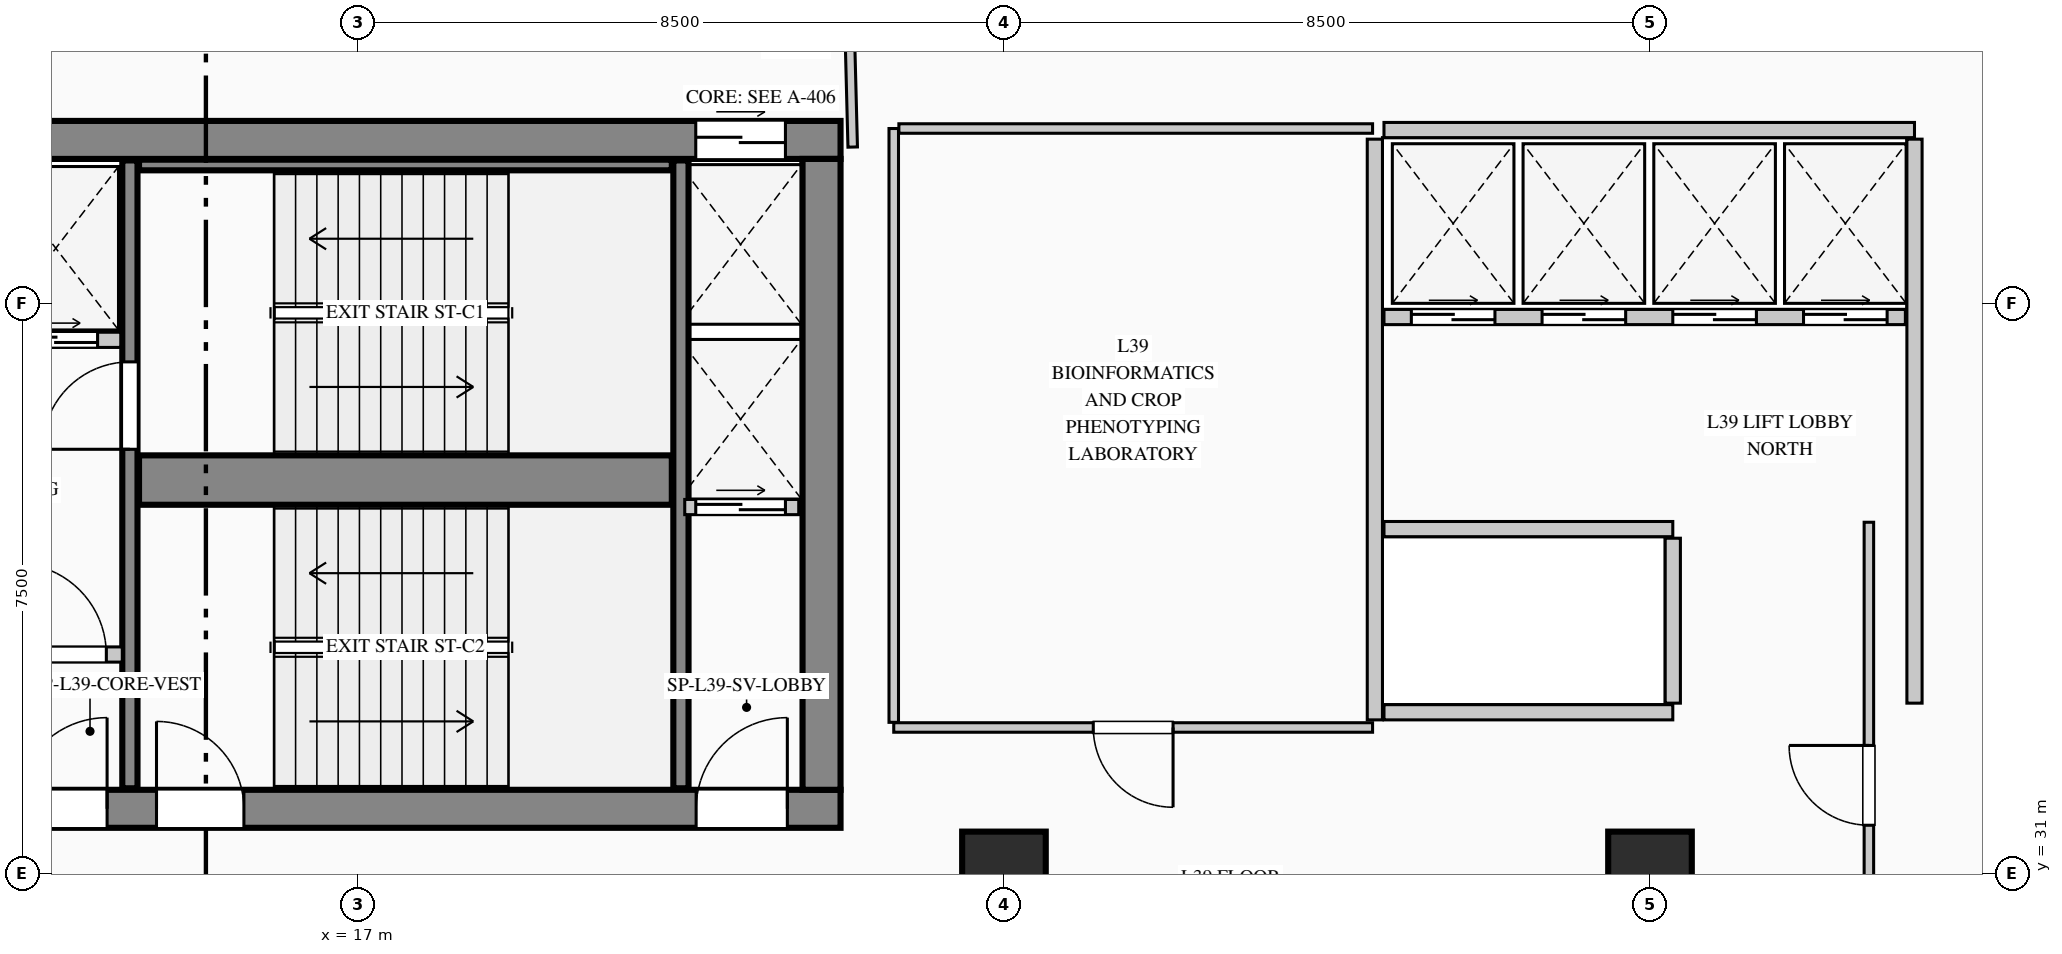
"""IFC4 building model, lengths in metres.
Left out: names, types, materials, properties, quantities, classifications, styles, units other than length and angle.
Written with IfcOpenShell. Run it as: python <this file> out.ifc"""

import sys

from ifc_helpers import new_model, si_unit, direction, frame, frame_2d, origin, origin_2d, place, context, subcontext, project, spatial, rectangle, extrude, element, fill, save


model = new_model("IFC4")
c1 = context("Model", 3, precision=1e-05, world=origin(), true_north=direction((0.0, 1.0)))
c2 = subcontext(c1, "Body", "Model", "MODEL_VIEW")
j1 = project(units=[si_unit("LENGTHUNIT", "METRE"), si_unit("PLANEANGLEUNIT", "RADIAN")], contexts=[c1])
p1 = place(None, origin())
s1 = spatial("IfcSite", under=j1, at=p1, CompositionType="ELEMENT")
p2 = place(p1, origin())
s2 = spatial("IfcBuilding", under=s1, at=p2, CompositionType="ELEMENT")
p3 = place(p2, frame((0.0, 0.0, 166.7)))
s3 = spatial("IfcBuildingStorey", under=s2, at=p3, CompositionType="ELEMENT", Elevation=166.7)
p4 = place(p3, frame((5.5, 40.65, 0.0), z_axis=(0.0, 0.0, 1.0), x_axis=(1.0, 0.0, 0.0)))
e1 = element("IfcWall", 1, at=p4, inside=s3, PredefinedType="SHEAR", context=c2, shape_type="SweptSolid", body=[
    extrude(rectangle(XDim=17.85, YDim=0.5, at=frame_2d((8.925, 0.0))), origin(), (0.0, 0.0, 1.0), 3.95),
])
p5 = place(p4, frame((15.945, 0.0, 0.0)))
e2 = element("IfcOpeningElement", 2, at=p5, cuts=e1, PredefinedType="OPENING", context=c2, shape_type="SweptSolid", body=[
    extrude(rectangle(XDim=1.18, YDim=2.25, at=frame_2d((0.59, 1.125))), frame((0.0, 0.26, 0.0), z_axis=(0.0, -1.0, 0.0), x_axis=(1.0, 0.0, 0.0)), (0.0, 0.0, 1.0), 0.52),
])
p6 = place(p3, frame((5.5, 31.85, 0.0), z_axis=(0.0, 0.0, 1.0), x_axis=(1.0, 0.0, 0.0)))
e3 = element("IfcWall", 3, at=p6, inside=s3, PredefinedType="SHEAR", context=c2, shape_type="SweptSolid", body=[
    extrude(rectangle(XDim=17.85, YDim=0.5, at=frame_2d((8.925, 0.0))), origin(), (0.0, 0.0, 1.0), 3.95),
])
p7 = place(p6, frame((3.15, 0.0, 0.0)))
e4 = element("IfcOpeningElement", 4, at=p7, cuts=e3, PredefinedType="OPENING", context=c2, shape_type="SweptSolid", body=[
    extrude(rectangle(XDim=1.2, YDim=2.2, at=frame_2d((0.6, 1.1))), frame((0.0, 0.26, 0.0), z_axis=(0.0, -1.0, 0.0), x_axis=(1.0, 0.0, 0.0)), (0.0, 0.0, 1.0), 0.52),
])
p8 = place(p6, frame((7.0, 0.0, 0.0)))
e5 = element("IfcOpeningElement", 5, at=p8, cuts=e3, PredefinedType="OPENING", context=c2, shape_type="SweptSolid", body=[
    extrude(rectangle(XDim=1.2, YDim=2.2, at=frame_2d((0.6, 1.1))), frame((0.0, 0.26, 0.0), z_axis=(0.0, -1.0, 0.0), x_axis=(1.0, 0.0, 0.0)), (0.0, 0.0, 1.0), 0.52),
])
p9 = place(p6, frame((8.85, 0.0, 0.0)))
e6 = element("IfcOpeningElement", 6, at=p9, cuts=e3, PredefinedType="OPENING", context=c2, shape_type="SweptSolid", body=[
    extrude(rectangle(XDim=1.15, YDim=2.2, at=frame_2d((0.575, 1.1))), frame((0.0, 0.26, 0.0), z_axis=(0.0, -1.0, 0.0), x_axis=(1.0, 0.0, 0.0)), (0.0, 0.0, 1.0), 0.52),
])
p10 = place(p6, frame((15.95, 0.0, 0.0)))
e7 = element("IfcOpeningElement", 7, at=p10, cuts=e3, PredefinedType="OPENING", context=c2, shape_type="SweptSolid", body=[
    extrude(rectangle(XDim=1.2, YDim=2.2, at=frame_2d((0.6, 1.1))), frame((0.0, 0.26, 0.0), z_axis=(0.0, -1.0, 0.0), x_axis=(1.0, 0.0, 0.0)), (0.0, 0.0, 1.0), 0.52),
])
p11 = place(p3, frame((23.1, 32.1, 0.0), z_axis=(0.0, 0.0, 1.0), x_axis=(0.0, 1.0, 0.0)))
e8 = element("IfcWall", 8, at=p11, inside=s3, PredefinedType="SHEAR", context=c2, shape_type="SweptSolid", body=[
    extrude(rectangle(XDim=8.3, YDim=0.5, at=frame_2d((4.15, 0.0))), origin(), (0.0, 0.0, 1.0), 3.95),
])
p12 = place(p3, frame((14.0, 32.12, 0.0), z_axis=(0.0, 0.0, 1.0), x_axis=(0.0, 1.0, 0.0)))
e9 = element("IfcWall", 9, at=p12, inside=s3, PredefinedType="SHEAR", context=c2, shape_type="SweptSolid", body=[
    extrude(rectangle(XDim=8.26, YDim=0.2, at=frame_2d((4.13, 0.0))), origin(), (0.0, 0.0, 1.0), 3.95),
])
p13 = place(p12, frame((4.46, 0.0, 0.0)))
e10 = element("IfcOpeningElement", 10, at=p13, cuts=e9, PredefinedType="OPENING", context=c2, shape_type="SweptSolid", body=[
    extrude(rectangle(XDim=1.15, YDim=2.2, at=frame_2d((0.575, 1.1))), frame((0.0, 0.11, 0.0), z_axis=(0.0, -1.0, 0.0), x_axis=(1.0, 0.0, 0.0)), (0.0, 0.0, 1.0), 0.22),
])
p14 = place(p3, frame((14.12, 36.175, 0.0), z_axis=(0.0, 0.0, 1.0), x_axis=(1.0, 0.0, 0.0)))
e11 = element("IfcWall", 11, at=p14, inside=s3, PredefinedType="SHEAR", context=c2, shape_type="SweptSolid", body=[
    extrude(rectangle(XDim=7.01, YDim=0.65, at=frame_2d((3.505, 0.0))), origin(), (0.0, 0.0, 1.0), 3.95),
])
p15 = place(p3, frame((21.25, 32.12, 0.0), z_axis=(0.0, 0.0, 1.0), x_axis=(0.0, 1.0, 0.0)))
e12 = element("IfcWall", 12, at=p15, inside=s3, PredefinedType="SHEAR", context=c2, shape_type="SweptSolid", body=[
    extrude(rectangle(XDim=8.26, YDim=0.2, at=frame_2d((4.13, 0.0))), origin(), (0.0, 0.0, 1.0), 3.95),
])
p16 = place(p3, frame((14.12, 40.32, 0.0), z_axis=(0.0, 0.0, 1.0), x_axis=(1.0, 0.0, 0.0)))
e13 = element("IfcWall", 13, at=p16, inside=s3, PredefinedType="SHEAR", context=c2, shape_type="SweptSolid", body=[
    extrude(rectangle(XDim=7.01, YDim=0.14, at=frame_2d((3.505, 0.0))), origin(), (0.0, 0.0, 1.0), 3.95),
])
for number, where, z_axis, x_axis in (
    (14, (25.5, 31.0, 0.0), (0.0, 0.0, 1.0), (1.0, 0.0, 0.0)),
    (15, (34.0, 31.0, 0.0), (0.0, 0.0, 1.0), (1.0, 0.0, 0.0)),
):
    element("IfcColumn", number, at=place(p3, frame(where, z_axis=z_axis, x_axis=x_axis)), inside=s3, PredefinedType="COLUMN", context=c2, shape_type="SweptSolid", body=[
        extrude(rectangle(XDim=1.1, YDim=1.1, at=origin_2d()), origin(), (0.0, 0.0, 1.0), 3.95),
    ])
p17 = place(p3, frame((10.34, 38.02, 0.0), z_axis=(0.0, 0.0, 1.0), x_axis=(1.0, 0.0, 0.0)))
e16 = element("IfcWall", 16, at=p17, inside=s3, PredefinedType="PARTITIONING", context=c2, shape_type="SweptSolid", body=[
    extrude(rectangle(XDim=3.54, YDim=0.2, at=frame_2d((1.77, 0.0))), origin(), (0.0, 0.0, 1.0), 3.69),
])
p18 = place(p17, frame((0.285, 0.0, 0.0)))
e17 = element("IfcOpeningElement", 17, at=p18, cuts=e16, PredefinedType="OPENING", context=c2, shape_type="SweptSolid", body=[
    extrude(rectangle(XDim=1.1, YDim=2.2, at=frame_2d((0.55, 1.1))), frame((0.0, 0.11, 0.0), z_axis=(0.0, -1.0, 0.0), x_axis=(1.0, 0.0, 0.0)), (0.0, 0.0, 1.0), 0.22),
])
p19 = place(p17, frame((2.135, 0.0, 0.0)))
e18 = element("IfcOpeningElement", 18, at=p19, cuts=e16, PredefinedType="OPENING", context=c2, shape_type="SweptSolid", body=[
    extrude(rectangle(XDim=1.1, YDim=2.2, at=frame_2d((0.55, 1.1))), frame((0.0, 0.11, 0.0), z_axis=(0.0, -1.0, 0.0), x_axis=(1.0, 0.0, 0.0)), (0.0, 0.0, 1.0), 0.22),
])
p20 = place(p3, frame((10.34, 33.88, 0.0), z_axis=(0.0, 0.0, 1.0), x_axis=(1.0, 0.0, 0.0)))
e19 = element("IfcWall", 19, at=p20, inside=s3, PredefinedType="PARTITIONING", context=c2, shape_type="SweptSolid", body=[
    extrude(rectangle(XDim=3.56, YDim=0.2, at=frame_2d((1.78, 0.0))), origin(), (0.0, 0.0, 1.0), 3.69),
])
p21 = place(p20, frame((2.15, 0.0, 0.0)))
e20 = element("IfcOpeningElement", 20, at=p21, cuts=e19, PredefinedType="OPENING", context=c2, shape_type="SweptSolid", body=[
    extrude(rectangle(XDim=1.2, YDim=2.2, at=frame_2d((0.6, 1.1))), frame((0.0, 0.11, 0.0), z_axis=(0.0, -1.0, 0.0), x_axis=(1.0, 0.0, 0.0)), (0.0, 0.0, 1.0), 0.22),
])
p22 = place(p3, frame((21.3, 35.82, 0.0), z_axis=(0.0, 0.0, 1.0), x_axis=(1.0, 0.0, 0.0)))
e21 = element("IfcWall", 21, at=p22, inside=s3, PredefinedType="PARTITIONING", context=c2, shape_type="SweptSolid", body=[
    extrude(rectangle(XDim=1.5, YDim=0.2, at=frame_2d((0.75, 0.0))), origin(), (0.0, 0.0, 1.0), 3.69),
])
p23 = place(p22, frame((0.145, 0.0, 0.0)))
e22 = element("IfcOpeningElement", 22, at=p23, cuts=e21, PredefinedType="OPENING", context=c2, shape_type="SweptSolid", body=[
    extrude(rectangle(XDim=1.18, YDim=2.25, at=frame_2d((0.59, 1.125))), frame((0.0, 0.11, 0.0), z_axis=(0.0, -1.0, 0.0), x_axis=(1.0, 0.0, 0.0)), (0.0, 0.0, 1.0), 0.22),
])
p24 = place(p3, frame((30.38, 33.02, 0.0), z_axis=(0.0, 0.0, 1.0), x_axis=(0.0, 1.0, 0.0)))
e23 = element("IfcWall", 23, at=p24, inside=s3, PredefinedType="PARTITIONING", context=c2, shape_type="SweptSolid", body=[
    extrude(rectangle(XDim=7.64, YDim=0.2, at=frame_2d((3.82, 0.0))), origin(), (0.0, 0.0, 1.0), 3.69),
])
p25 = place(p3, frame((30.5, 40.78, 0.0), z_axis=(0.0, 0.0, 1.0), x_axis=(1.0, 0.0, 0.0)))
e24 = element("IfcWall", 24, at=p25, inside=s3, PredefinedType="PARTITIONING", context=c2, shape_type="SweptSolid", body=[
    extrude(rectangle(XDim=6.98, YDim=0.2, at=frame_2d((3.49, 0.0))), origin(), (0.0, 0.0, 1.0), 3.69),
])
p26 = place(p3, frame((37.48, 33.24, 0.0), z_axis=(0.0, 0.0, 1.0), x_axis=(0.0, 1.0, 0.0)))
e25 = element("IfcWall", 25, at=p26, inside=s3, PredefinedType="PARTITIONING", context=c2, shape_type="SweptSolid", body=[
    extrude(rectangle(XDim=7.42, YDim=0.2, at=frame_2d((3.71, 0.0))), origin(), (0.0, 0.0, 1.0), 3.69),
])
p27 = place(p3, frame((30.5, 38.32, 0.0), z_axis=(0.0, 0.0, 1.0), x_axis=(1.0, 0.0, 0.0)))
e26 = element("IfcWall", 26, at=p27, inside=s3, PredefinedType="PARTITIONING", context=c2, shape_type="SweptSolid", body=[
    extrude(rectangle(XDim=6.86, YDim=0.2, at=frame_2d((3.43, 0.0))), origin(), (0.0, 0.0, 1.0), 3.69),
])
p28 = place(p27, frame((0.36, 0.0, 0.0)))
e27 = element("IfcOpeningElement", 27, at=p28, cuts=e26, PredefinedType="OPENING", context=c2, shape_type="SweptSolid", body=[
    extrude(rectangle(XDim=1.1, YDim=2.2, at=frame_2d((0.55, 1.1))), frame((0.0, 0.11, 0.0), z_axis=(0.0, -1.0, 0.0), x_axis=(1.0, 0.0, 0.0)), (0.0, 0.0, 1.0), 0.22),
])
p29 = place(p27, frame((2.08, 0.0, 0.0)))
e28 = element("IfcOpeningElement", 28, at=p29, cuts=e26, PredefinedType="OPENING", context=c2, shape_type="SweptSolid", body=[
    extrude(rectangle(XDim=1.1, YDim=2.2, at=frame_2d((0.55, 1.1))), frame((0.0, 0.11, 0.0), z_axis=(0.0, -1.0, 0.0), x_axis=(1.0, 0.0, 0.0)), (0.0, 0.0, 1.0), 0.22),
])
p30 = place(p27, frame((3.8, 0.0, 0.0)))
e29 = element("IfcOpeningElement", 29, at=p30, cuts=e26, PredefinedType="OPENING", context=c2, shape_type="SweptSolid", body=[
    extrude(rectangle(XDim=1.1, YDim=2.2, at=frame_2d((0.55, 1.1))), frame((0.0, 0.11, 0.0), z_axis=(0.0, -1.0, 0.0), x_axis=(1.0, 0.0, 0.0)), (0.0, 0.0, 1.0), 0.22),
])
p31 = place(p27, frame((5.52, 0.0, 0.0)))
e30 = element("IfcOpeningElement", 30, at=p31, cuts=e26, PredefinedType="OPENING", context=c2, shape_type="SweptSolid", body=[
    extrude(rectangle(XDim=1.1, YDim=2.2, at=frame_2d((0.55, 1.1))), frame((0.0, 0.11, 0.0), z_axis=(0.0, -1.0, 0.0), x_axis=(1.0, 0.0, 0.0)), (0.0, 0.0, 1.0), 0.22),
])
for number, where, z_axis, x_axis in (
    (31, (30.5, 35.53, 0.0), (0.0, 0.0, 1.0), (1.0, 0.0, 0.0)),
    (32, (30.5, 33.12, 0.0), (0.0, 0.0, 1.0), (1.0, 0.0, 0.0)),
):
    element("IfcWall", number, at=place(p3, frame(where, z_axis=z_axis, x_axis=x_axis)), inside=s3, PredefinedType="PARTITIONING", context=c2, shape_type="SweptSolid", body=[
        extrude(rectangle(XDim=3.8, YDim=0.2, at=frame_2d((1.9, 0.0))), origin(), (0.0, 0.0, 1.0), 3.69),
    ])
p32 = place(p3, frame((34.3, 33.24, 0.0), z_axis=(0.0, 0.0, 1.0), x_axis=(0.0, 1.0, 0.0)))
e33 = element("IfcWall", 33, at=p32, inside=s3, PredefinedType="PARTITIONING", context=c2, shape_type="SweptSolid", body=[
    extrude(rectangle(XDim=2.17, YDim=0.2, at=frame_2d((1.085, 0.0))), origin(), (0.0, 0.0, 1.0), 3.69),
])
p33 = place(p3, frame((30.35, 32.92, 0.0), z_axis=(0.0, 0.0, 1.0), x_axis=(-1.0, 0.0, 0.0)))
e34 = element("IfcWall", 34, at=p33, inside=s3, PredefinedType="PARTITIONING", context=c2, shape_type="SweptSolid", body=[
    extrude(rectangle(XDim=6.3, YDim=0.125, at=frame_2d((3.15, 0.0))), origin(), (0.0, 0.0, 1.0), 3.69),
])
p34 = place(p33, frame((2.625, 0.0, 0.0)))
e35 = element("IfcOpeningElement", 35, at=p34, cuts=e34, PredefinedType="OPENING", context=c2, shape_type="SweptSolid", body=[
    extrude(rectangle(XDim=1.05, YDim=2.15, at=frame_2d((0.525, 1.075))), frame((0.0, 0.073, 0.0), z_axis=(0.0, -1.0, 0.0), x_axis=(1.0, 0.0, 0.0)), (0.0, 0.0, 1.0), 0.145),
])
p35 = place(p3, frame((24.05, 32.988, 0.0), z_axis=(0.0, 0.0, 1.0), x_axis=(0.0, 1.0, 0.0)))
e36 = element("IfcWall", 36, at=p35, inside=s3, PredefinedType="PARTITIONING", context=c2, shape_type="SweptSolid", body=[
    extrude(rectangle(XDim=7.812, YDim=0.125, at=frame_2d((3.906, 0.0))), origin(), (0.0, 0.0, 1.0), 3.69),
])
p36 = place(p3, frame((24.117, 40.8, 0.0), z_axis=(0.0, 0.0, 1.0), x_axis=(1.0, 0.0, 0.0)))
e37 = element("IfcWall", 37, at=p36, inside=s3, PredefinedType="PARTITIONING", context=c2, shape_type="SweptSolid", body=[
    extrude(rectangle(XDim=6.233, YDim=0.125, at=frame_2d((3.116, 0.0))), origin(), (0.0, 0.0, 1.0), 3.69),
])
p37 = place(p3, frame((23.51, 40.556, 0.0), z_axis=(0.0, 0.0, 1.0), x_axis=(-0.02567646332, 0.999670305266, 0.0)))
e38 = element("IfcWall", 38, at=p37, inside=s3, PredefinedType="PARTITIONING", context=c2, shape_type="SweptSolid", body=[
    extrude(rectangle(XDim=2.71, YDim=0.125, at=frame_2d((1.355, 0.0))), origin(), (0.0, 0.0, 1.0), 3.69),
])
p38 = place(p3, frame((36.88, 28.698, 0.0), z_axis=(0.0, 0.0, 1.0), x_axis=(0.0, 1.0, 0.0)))
e39 = element("IfcWall", 39, at=p38, inside=s3, PredefinedType="PARTITIONING", context=c2, shape_type="SweptSolid", body=[
    extrude(rectangle(XDim=6.923, YDim=0.125, at=frame_2d((3.461, 0.0))), origin(), (0.0, 0.0, 1.0), 3.69),
])
p39 = place(p38, frame((2.936, 0.0, 0.0)))
e40 = element("IfcOpeningElement", 40, at=p39, cuts=e39, PredefinedType="OPENING", context=c2, shape_type="SweptSolid", body=[
    extrude(rectangle(XDim=1.05, YDim=2.15, at=frame_2d((0.525, 1.075))), frame((0.0, 0.073, 0.0), z_axis=(0.0, -1.0, 0.0), x_axis=(1.0, 0.0, 0.0)), (0.0, 0.0, 1.0), 0.145),
])
p40 = place(p8, origin())
e41 = element("IfcDoor", 41, at=p40, inside=s3, OperationType="SINGLE_SWING_RIGHT", PredefinedType="DOOR", context=c2, shape_type="SweptSolid", body=[
    extrude(rectangle(XDim=1.2, YDim=2.2, at=frame_2d((0.6, 1.1))), frame((0.0, 0.025, 0.0), z_axis=(0.0, -1.0, 0.0), x_axis=(1.0, 0.0, 0.0)), (0.0, 0.0, 1.0), 0.05),
])
fill(e5, e41)
p41 = place(p9, origin())
e42 = element("IfcDoor", 42, at=p41, inside=s3, OperationType="SINGLE_SWING_LEFT", PredefinedType="DOOR", context=c2, shape_type="SweptSolid", body=[
    extrude(rectangle(XDim=1.15, YDim=2.2, at=frame_2d((0.575, 1.1))), frame((0.0, 0.025, 0.0), z_axis=(0.0, -1.0, 0.0), x_axis=(1.0, 0.0, 0.0)), (0.0, 0.0, 1.0), 0.05),
])
fill(e6, e42)
p42 = place(p10, origin())
e43 = element("IfcDoor", 43, at=p42, inside=s3, OperationType="SINGLE_SWING_RIGHT", PredefinedType="DOOR", context=c2, shape_type="SweptSolid", body=[
    extrude(rectangle(XDim=1.2, YDim=2.2, at=frame_2d((0.6, 1.1))), frame((0.0, 0.025, 0.0), z_axis=(0.0, -1.0, 0.0), x_axis=(1.0, 0.0, 0.0)), (0.0, 0.0, 1.0), 0.05),
])
fill(e7, e43)
p43 = place(p21, origin())
e44 = element("IfcDoor", 44, at=p43, inside=s3, OperationType="SINGLE_SWING_LEFT", PredefinedType="DOOR", context=c2, shape_type="SweptSolid", body=[
    extrude(rectangle(XDim=1.2, YDim=2.2, at=frame_2d((0.6, 1.1))), frame((0.0, 0.025, 0.0), z_axis=(0.0, -1.0, 0.0), x_axis=(1.0, 0.0, 0.0)), (0.0, 0.0, 1.0), 0.05),
])
fill(e20, e44)
p44 = place(p13, origin())
e45 = element("IfcDoor", 45, at=p44, inside=s3, OperationType="SINGLE_SWING_LEFT", PredefinedType="DOOR", context=c2, shape_type="SweptSolid", body=[
    extrude(rectangle(XDim=1.15, YDim=2.2, at=frame_2d((0.575, 1.1))), frame((0.0, 0.025, 0.0), z_axis=(0.0, -1.0, 0.0), x_axis=(1.0, 0.0, 0.0)), (0.0, 0.0, 1.0), 0.05),
])
fill(e10, e45)
p45 = place(p19, origin())
e46 = element("IfcDoor", 46, at=p45, inside=s3, OperationType="DOUBLE_DOOR_SLIDING", PredefinedType="DOOR", context=c2, shape_type="SweptSolid", body=[
    extrude(rectangle(XDim=1.1, YDim=2.2, at=frame_2d((0.55, 1.1))), frame((0.0, 0.025, 0.0), z_axis=(0.0, -1.0, 0.0), x_axis=(1.0, 0.0, 0.0)), (0.0, 0.0, 1.0), 0.05),
])
fill(e18, e46)
p46 = place(p5, origin())
e47 = element("IfcDoor", 47, at=p46, inside=s3, OperationType="DOUBLE_DOOR_SLIDING", PredefinedType="DOOR", context=c2, shape_type="SweptSolid", body=[
    extrude(rectangle(XDim=1.18, YDim=2.25, at=frame_2d((0.59, 1.125))), frame((0.0, 0.025, 0.0), z_axis=(0.0, -1.0, 0.0), x_axis=(1.0, 0.0, 0.0)), (0.0, 0.0, 1.0), 0.05),
])
fill(e2, e47)
p47 = place(p23, origin())
e48 = element("IfcDoor", 48, at=p47, inside=s3, OperationType="DOUBLE_DOOR_SLIDING", PredefinedType="DOOR", context=c2, shape_type="SweptSolid", body=[
    extrude(rectangle(XDim=1.18, YDim=2.25, at=frame_2d((0.59, 1.125))), frame((0.0, 0.025, 0.0), z_axis=(0.0, -1.0, 0.0), x_axis=(1.0, 0.0, 0.0)), (0.0, 0.0, 1.0), 0.05),
])
fill(e22, e48)
p48 = place(p28, origin())
e49 = element("IfcDoor", 49, at=p48, inside=s3, OperationType="DOUBLE_DOOR_SLIDING", PredefinedType="DOOR", context=c2, shape_type="SweptSolid", body=[
    extrude(rectangle(XDim=1.1, YDim=2.2, at=frame_2d((0.55, 1.1))), frame((0.0, 0.025, 0.0), z_axis=(0.0, -1.0, 0.0), x_axis=(1.0, 0.0, 0.0)), (0.0, 0.0, 1.0), 0.05),
])
fill(e27, e49)
p49 = place(p29, origin())
e50 = element("IfcDoor", 50, at=p49, inside=s3, OperationType="DOUBLE_DOOR_SLIDING", PredefinedType="DOOR", context=c2, shape_type="SweptSolid", body=[
    extrude(rectangle(XDim=1.1, YDim=2.2, at=frame_2d((0.55, 1.1))), frame((0.0, 0.025, 0.0), z_axis=(0.0, -1.0, 0.0), x_axis=(1.0, 0.0, 0.0)), (0.0, 0.0, 1.0), 0.05),
])
fill(e28, e50)
p50 = place(p30, origin())
e51 = element("IfcDoor", 51, at=p50, inside=s3, OperationType="DOUBLE_DOOR_SLIDING", PredefinedType="DOOR", context=c2, shape_type="SweptSolid", body=[
    extrude(rectangle(XDim=1.1, YDim=2.2, at=frame_2d((0.55, 1.1))), frame((0.0, 0.025, 0.0), z_axis=(0.0, -1.0, 0.0), x_axis=(1.0, 0.0, 0.0)), (0.0, 0.0, 1.0), 0.05),
])
fill(e29, e51)
p51 = place(p31, origin())
e52 = element("IfcDoor", 52, at=p51, inside=s3, OperationType="DOUBLE_DOOR_SLIDING", PredefinedType="DOOR", context=c2, shape_type="SweptSolid", body=[
    extrude(rectangle(XDim=1.1, YDim=2.2, at=frame_2d((0.55, 1.1))), frame((0.0, 0.025, 0.0), z_axis=(0.0, -1.0, 0.0), x_axis=(1.0, 0.0, 0.0)), (0.0, 0.0, 1.0), 0.05),
])
fill(e30, e52)
p52 = place(p34, origin())
e53 = element("IfcDoor", 53, at=p52, inside=s3, OperationType="SINGLE_SWING_LEFT", PredefinedType="DOOR", context=c2, shape_type="SweptSolid", body=[
    extrude(rectangle(XDim=1.05, YDim=2.15, at=frame_2d((0.525, 1.075))), frame((0.0, 0.025, 0.0), z_axis=(0.0, -1.0, 0.0), x_axis=(1.0, 0.0, 0.0)), (0.0, 0.0, 1.0), 0.05),
])
fill(e35, e53)
p53 = place(p39, origin())
e54 = element("IfcDoor", 54, at=p53, inside=s3, OperationType="SINGLE_SWING_RIGHT", PredefinedType="DOOR", context=c2, shape_type="SweptSolid", body=[
    extrude(rectangle(XDim=1.05, YDim=2.15, at=frame_2d((0.525, 1.075))), frame((0.0, 0.025, 0.0), z_axis=(0.0, -1.0, 0.0), x_axis=(1.0, 0.0, 0.0)), (0.0, 0.0, 1.0), 0.05),
])
fill(e40, e54)
save(model, sys.argv[1])
